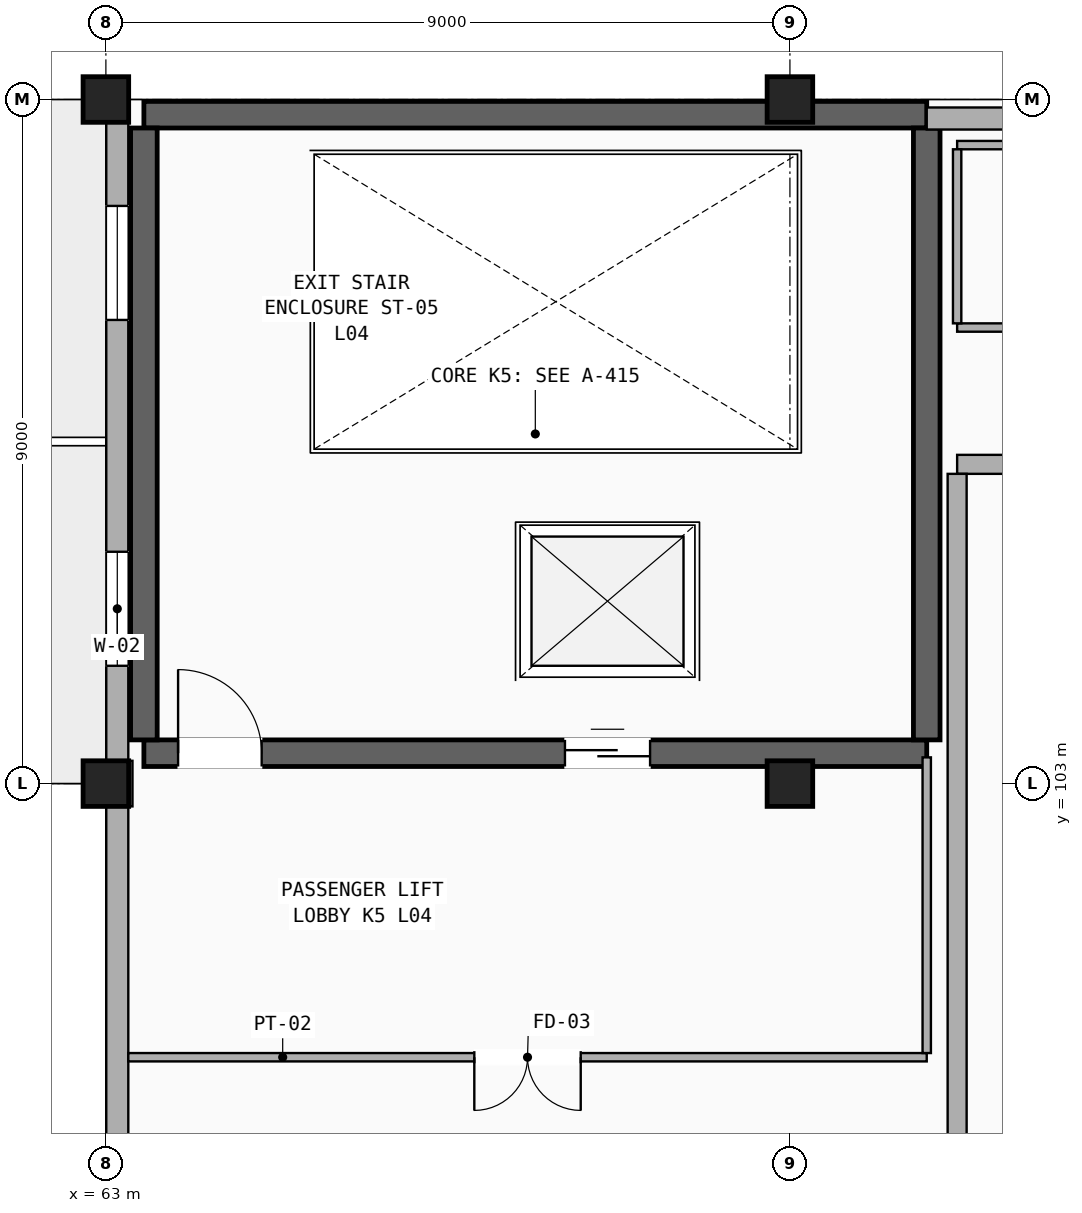
"""IFC4 building model, lengths in metres.
Left out: names, types, materials, properties, quantities, classifications, styles, units other than length and angle.
Written with IfcOpenShell. Run it as: python <this file> out.ifc"""

import sys

from ifc_helpers import new_model, si_unit, direction, frame, frame_2d, origin, origin_2d, place, context, subcontext, project, spatial, rectangle, extrude, element, fill, save


model = new_model("IFC4")
c1 = context("Model", 3, precision=1e-05, world=origin(), true_north=direction((0.0, 1.0)))
c2 = subcontext(c1, "Body", "Model", "MODEL_VIEW")
j1 = project(units=[si_unit("LENGTHUNIT", "METRE"), si_unit("PLANEANGLEUNIT", "RADIAN")], contexts=[c1])
p1 = place(None, origin())
s1 = spatial("IfcSite", under=j1, at=p1, CompositionType="ELEMENT")
p2 = place(p1, origin())
s2 = spatial("IfcBuilding", under=s1, at=p2, CompositionType="ELEMENT")
p3 = place(p2, frame((0.0, 0.0, 17.68)))
s3 = spatial("IfcBuildingStorey", under=s2, at=p3, CompositionType="ELEMENT", Elevation=17.68)
for number, where, z_axis, x_axis in (
    (1, (63.0, 103.0, 0.0), (0.0, 0.0, 1.0), (1.0, 0.0, 0.0)),
    (2, (63.0, 112.0, 0.0), (0.0, 0.0, 1.0), (1.0, 0.0, 0.0)),
    (3, (72.0, 103.0, 0.0), (0.0, 0.0, 1.0), (1.0, 0.0, 0.0)),
    (4, (72.0, 112.0, 0.0), (0.0, 0.0, 1.0), (1.0, 0.0, 0.0)),
):
    element("IfcColumn", number, at=place(p3, frame(where, z_axis=z_axis, x_axis=x_axis)), inside=s3, PredefinedType="COLUMN", context=c2, shape_type="SweptSolid", body=[
        extrude(rectangle(XDim=0.6, YDim=0.6, at=origin_2d()), origin(), (0.0, 0.0, 1.0), 4.08),
    ])
p4 = place(p3, frame((63.5, 103.4, 0.0), z_axis=(0.0, 0.0, 1.0), x_axis=(1.0, 0.0, 0.0)))
e5 = element("IfcWall", 5, at=p4, inside=s3, PredefinedType="SHEAR", context=c2, shape_type="SweptSolid", body=[
    extrude(rectangle(XDim=10.3, YDim=0.35, at=frame_2d((5.15, 0.0))), origin(), (0.0, 0.0, 1.0), 4.08),
])
p5 = place(p4, frame((0.45, 0.0, 0.0)))
e6 = element("IfcOpeningElement", 6, at=p5, cuts=e5, PredefinedType="OPENING", context=c2, shape_type="SweptSolid", body=[
    extrude(rectangle(XDim=1.1, YDim=2.2, at=frame_2d((0.55, 1.1))), frame((0.0, 0.185, 0.0), z_axis=(0.0, -1.0, 0.0), x_axis=(1.0, 0.0, 0.0)), (0.0, 0.0, 1.0), 0.37),
])
p6 = place(p4, frame((5.54, 0.0, 0.0)))
e7 = element("IfcOpeningElement", 7, at=p6, cuts=e5, PredefinedType="OPENING", context=c2, shape_type="SweptSolid", body=[
    extrude(rectangle(XDim=1.12, YDim=2.16, at=frame_2d((0.56, 1.08))), frame((0.0, 0.185, 0.0), z_axis=(0.0, -1.0, 0.0), x_axis=(1.0, 0.0, 0.0)), (0.0, 0.0, 1.0), 0.37),
])
p7 = place(p3, frame((63.5, 111.8, 0.0), z_axis=(0.0, 0.0, 1.0), x_axis=(1.0, 0.0, 0.0)))
e8 = element("IfcWall", 8, at=p7, inside=s3, PredefinedType="SHEAR", context=c2, shape_type="SweptSolid", body=[
    extrude(rectangle(XDim=10.3, YDim=0.35, at=frame_2d((5.15, 0.0))), origin(), (0.0, 0.0, 1.0), 4.08),
])
for number, where, z_axis, x_axis in (
    (9, (63.5, 103.575, 0.0), (0.0, 0.0, 1.0), (0.0, 1.0, 0.0)),
    (10, (73.8, 103.575, 0.0), (0.0, 0.0, 1.0), (0.0, 1.0, 0.0)),
):
    element("IfcWall", number, at=place(p3, frame(where, z_axis=z_axis, x_axis=x_axis)), inside=s3, PredefinedType="SHEAR", context=c2, shape_type="SweptSolid", body=[
        extrude(rectangle(XDim=8.05, YDim=0.35, at=frame_2d((4.025, 0.0))), origin(), (0.0, 0.0, 1.0), 4.08),
    ])
p8 = place(p3, frame((73.8, 111.75, 0.0), z_axis=(0.0, 0.0, 1.0), x_axis=(1.0, 0.0, 0.0)))
e11 = element("IfcWall", 11, at=p8, inside=s3, PredefinedType="STANDARD", context=c2, shape_type="SweptSolid", body=[
    extrude(rectangle(XDim=6.9, YDim=0.29, at=frame_2d((3.45, 0.0))), origin(), (0.0, 0.0, 1.0), 3.277),
])
p9 = place(p8, frame((2.845, 0.0, 0.9)))
e12 = element("IfcOpeningElement", 12, at=p9, cuts=e11, PredefinedType="OPENING", context=c2, shape_type="SweptSolid", body=[
    extrude(rectangle(XDim=1.56, YDim=1.72, at=frame_2d((0.78, 0.86))), frame((0.0, 0.155, 0.0), z_axis=(0.0, -1.0, 0.0), x_axis=(1.0, 0.0, 0.0)), (0.0, 0.0, 1.0), 0.31),
])
p10 = place(p3, frame((63.15, 94.3, 0.0), z_axis=(0.0, 0.0, 1.0), x_axis=(0.0, 1.0, 0.0)))
e13 = element("IfcWall", 13, at=p10, inside=s3, PredefinedType="STANDARD", context=c2, shape_type="SweptSolid", body=[
    extrude(rectangle(XDim=8.4, YDim=0.29, at=frame_2d((4.2, 0.0))), origin(), (0.0, 0.0, 1.0), 3.277),
])
p11 = place(p10, frame((1.35, 0.0, 0.9)))
e14 = element("IfcOpeningElement", 14, at=p11, cuts=e13, PredefinedType="OPENING", context=c2, shape_type="SweptSolid", body=[
    extrude(rectangle(XDim=1.48, YDim=1.9, at=frame_2d((0.74, 0.95))), frame((0.0, 0.155, 0.0), z_axis=(0.0, -1.0, 0.0), x_axis=(1.0, 0.0, 0.0)), (0.0, 0.0, 1.0), 0.31),
])
p12 = place(p3, frame((63.15, 103.3, 0.0), z_axis=(0.0, 0.0, 1.0), x_axis=(0.0, 1.0, 0.0)))
e15 = element("IfcWall", 15, at=p12, inside=s3, PredefinedType="STANDARD", context=c2, shape_type="SweptSolid", body=[
    extrude(rectangle(XDim=8.4, YDim=0.29, at=frame_2d((4.2, 0.0))), origin(), (0.0, 0.0, 1.0), 3.277),
])
p13 = place(p12, frame((1.25, 0.0, 0.9)))
e16 = element("IfcOpeningElement", 16, at=p13, cuts=e15, PredefinedType="OPENING", context=c2, shape_type="SweptSolid", body=[
    extrude(rectangle(XDim=1.5, YDim=2.1, at=frame_2d((0.75, 1.05))), frame((0.0, 0.155, 0.0), z_axis=(0.0, -1.0, 0.0), x_axis=(1.0, 0.0, 0.0)), (0.0, 0.0, 1.0), 0.31),
])
p14 = place(p12, frame((5.8, 0.0, 0.9)))
e17 = element("IfcOpeningElement", 17, at=p14, cuts=e15, PredefinedType="OPENING", context=c2, shape_type="SweptSolid", body=[
    extrude(rectangle(XDim=1.5, YDim=2.1, at=frame_2d((0.75, 1.05))), frame((0.0, 0.155, 0.0), z_axis=(0.0, -1.0, 0.0), x_axis=(1.0, 0.0, 0.0)), (0.0, 0.0, 1.0), 0.31),
])
p15 = place(p3, frame((63.295, 99.4, 0.0), z_axis=(0.0, 0.0, 1.0), x_axis=(1.0, 0.0, 0.0)))
e18 = element("IfcWall", 18, at=p15, inside=s3, PredefinedType="PARTITIONING", context=c2, shape_type="SweptSolid", body=[
    extrude(rectangle(XDim=10.505, YDim=0.11, at=frame_2d((5.252, 0.0))), origin(), (0.0, 0.0, 1.0), 3.277),
])
p16 = place(p15, frame((4.552, 0.0, 0.0)))
e19 = element("IfcOpeningElement", 19, at=p16, cuts=e18, PredefinedType="OPENING", context=c2, shape_type="SweptSolid", body=[
    extrude(rectangle(XDim=1.4, YDim=2.2, at=frame_2d((0.7, 1.1))), frame((0.0, 0.065, 0.0), z_axis=(0.0, -1.0, 0.0), x_axis=(1.0, 0.0, 0.0)), (0.0, 0.0, 1.0), 0.13),
])
p17 = place(p3, frame((63.295, 102.7, 0.0), z_axis=(0.0, 0.0, 1.0), x_axis=(0.0, 1.0, 0.0)))
e20 = element("IfcWall", 20, at=p17, inside=s3, PredefinedType="PARTITIONING", context=c2, shape_type="SweptSolid", body=[
    extrude(rectangle(XDim=0.6, YDim=0.11, at=frame_2d((0.3, 0.0))), origin(), (0.0, 0.0, 1.0), 3.84),
])
p18 = place(p3, frame((73.8, 99.455, 0.0), z_axis=(0.0, 0.0, 1.0), x_axis=(0.0, 1.0, 0.0)))
e21 = element("IfcWall", 21, at=p18, inside=s3, PredefinedType="PARTITIONING", context=c2, shape_type="SweptSolid", body=[
    extrude(rectangle(XDim=3.89, YDim=0.11, at=frame_2d((1.945, 0.0))), origin(), (0.0, 0.0, 1.0), 3.84),
])
p19 = place(p3, frame((74.2, 107.2, 0.0), z_axis=(0.0, 0.0, 1.0), x_axis=(1.0, 0.0, 0.0)))
e22 = element("IfcWall", 22, at=p19, inside=s3, PredefinedType="PARTITIONING", context=c2, shape_type="SweptSolid", body=[
    extrude(rectangle(XDim=24.2, YDim=0.25, at=frame_2d((12.1, 0.0))), origin(), (0.0, 0.0, 1.0), 3.277),
])
p20 = place(p3, frame((74.2, 97.725, 0.0), z_axis=(0.0, 0.0, 1.0), x_axis=(0.0, 1.0, 0.0)))
e23 = element("IfcWall", 23, at=p20, inside=s3, PredefinedType="PARTITIONING", context=c2, shape_type="SweptSolid", body=[
    extrude(rectangle(XDim=9.35, YDim=0.25, at=frame_2d((4.675, 0.0))), origin(), (0.0, 0.0, 1.0), 3.84),
])
p21 = place(p3, frame((74.2, 109.0, 0.0), z_axis=(0.0, 0.0, 1.0), x_axis=(1.0, 0.0, 0.0)))
e24 = element("IfcWall", 24, at=p21, inside=s3, PredefinedType="PARTITIONING", context=c2, shape_type="SweptSolid", body=[
    extrude(rectangle(XDim=38.8, YDim=0.11, at=frame_2d((19.4, 0.0))), origin(), (0.0, 0.0, 1.0), 3.277),
])
p22 = place(p21, frame((18.8, 0.0, 0.0)))
e25 = element("IfcOpeningElement", 25, at=p22, cuts=e24, PredefinedType="OPENING", context=c2, shape_type="SweptSolid", body=[
    extrude(rectangle(XDim=1.2, YDim=2.2, at=frame_2d((0.6, 1.1))), frame((0.0, 0.065, 0.0), z_axis=(0.0, -1.0, 0.0), x_axis=(1.0, 0.0, 0.0)), (0.0, 0.0, 1.0), 0.13),
])
p23 = place(p3, frame((74.2, 111.4, 0.0), z_axis=(0.0, 0.0, 1.0), x_axis=(1.0, 0.0, 0.0)))
e26 = element("IfcWall", 26, at=p23, inside=s3, PredefinedType="PARTITIONING", context=c2, shape_type="SweptSolid", body=[
    extrude(rectangle(XDim=38.8, YDim=0.11, at=frame_2d((19.4, 0.0))), origin(), (0.0, 0.0, 1.0), 3.277),
])
p24 = place(p3, frame((74.2, 109.055, 0.0), z_axis=(0.0, 0.0, 1.0), x_axis=(0.0, 1.0, 0.0)))
e27 = element("IfcWall", 27, at=p24, inside=s3, PredefinedType="PARTITIONING", context=c2, shape_type="SweptSolid", body=[
    extrude(rectangle(XDim=2.29, YDim=0.11, at=frame_2d((1.145, 0.0))), origin(), (0.0, 0.0, 1.0), 3.84),
])
p25 = place(p13, origin())
e28 = element("IfcWindow", 28, at=p25, inside=s3, PartitioningType="DOUBLE_PANEL_VERTICAL", PredefinedType="WINDOW", context=c2, shape_type="SweptSolid", body=[
    extrude(rectangle(XDim=1.5, YDim=2.1, at=frame_2d((0.75, 1.05))), frame((0.0, 0.03, 0.0), z_axis=(0.0, -1.0, 0.0), x_axis=(1.0, 0.0, 0.0)), (0.0, 0.0, 1.0), 0.06),
])
fill(e16, e28)
p26 = place(p14, origin())
e29 = element("IfcWindow", 29, at=p26, inside=s3, PartitioningType="DOUBLE_PANEL_VERTICAL", PredefinedType="WINDOW", context=c2, shape_type="SweptSolid", body=[
    extrude(rectangle(XDim=1.5, YDim=2.1, at=frame_2d((0.75, 1.05))), frame((0.0, 0.03, 0.0), z_axis=(0.0, -1.0, 0.0), x_axis=(1.0, 0.0, 0.0)), (0.0, 0.0, 1.0), 0.06),
])
fill(e17, e29)
p27 = place(p5, origin())
e30 = element("IfcDoor", 30, at=p27, inside=s3, OperationType="SINGLE_SWING_LEFT", PredefinedType="DOOR", context=c2, shape_type="SweptSolid", body=[
    extrude(rectangle(XDim=1.1, YDim=2.2, at=frame_2d((0.55, 1.1))), frame((0.0, 0.025, 0.0), z_axis=(0.0, -1.0, 0.0), x_axis=(1.0, 0.0, 0.0)), (0.0, 0.0, 1.0), 0.05),
])
fill(e6, e30)
p28 = place(p6, origin())
e31 = element("IfcDoor", 31, at=p28, inside=s3, OperationType="SLIDING_TO_LEFT", PredefinedType="DOOR", context=c2, shape_type="SweptSolid", body=[
    extrude(rectangle(XDim=1.12, YDim=2.16, at=frame_2d((0.56, 1.08))), frame((0.0, 0.025, 0.0), z_axis=(0.0, -1.0, 0.0), x_axis=(1.0, 0.0, 0.0)), (0.0, 0.0, 1.0), 0.05),
])
fill(e7, e31)
p29 = place(p16, frame((1.4, 0.0, 0.0), z_axis=(0.0, 0.0, 1.0), x_axis=(-1.0, 0.0, 0.0)))
e32 = element("IfcDoor", 32, at=p29, inside=s3, OperationType="DOUBLE_DOOR_SINGLE_SWING", PredefinedType="DOOR", context=c2, shape_type="SweptSolid", body=[
    extrude(rectangle(XDim=1.4, YDim=2.2, at=frame_2d((0.7, 1.1))), frame((0.0, 0.025, 0.0), z_axis=(0.0, -1.0, 0.0), x_axis=(1.0, 0.0, 0.0)), (0.0, 0.0, 1.0), 0.05),
])
fill(e19, e32)
save(model, sys.argv[1])
